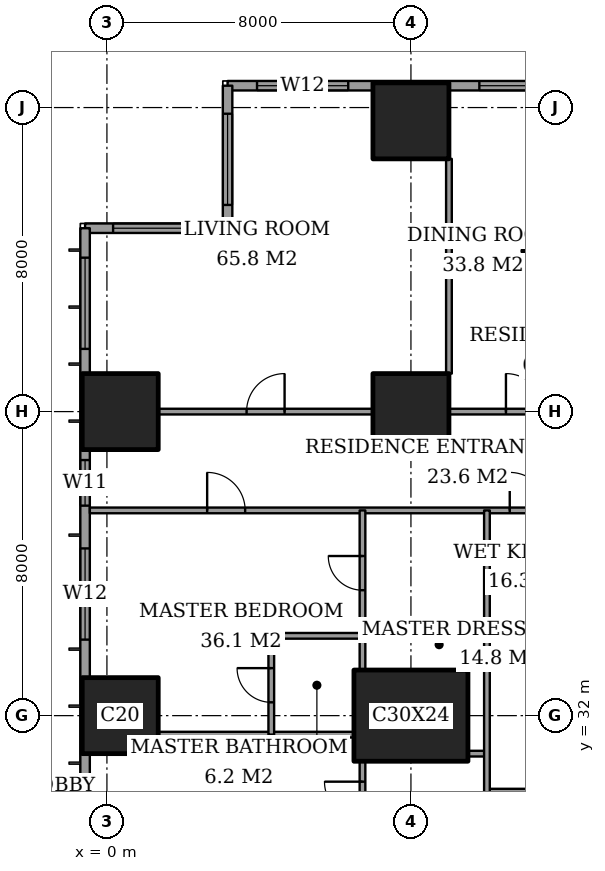
"""IFC4 building model, lengths in metres.
Left out: names, types, materials, properties, quantities, classifications, styles, units other than length and angle.
Written with IfcOpenShell. Run it as: python <this file> out.ifc"""

import sys

from ifc_helpers import new_model, si_unit, direction, frame, frame_2d, origin, origin_2d, place, context, subcontext, project, spatial, rectangle, extrude, element, fill, save


model = new_model("IFC4")
c1 = context("Model", 3, precision=1e-05, world=origin(), true_north=direction((0.0, 1.0)))
c2 = subcontext(c1, "Body", "Model", "MODEL_VIEW")
j1 = project(units=[si_unit("LENGTHUNIT", "METRE"), si_unit("PLANEANGLEUNIT", "RADIAN")], contexts=[c1])
p1 = place(None, origin())
s1 = spatial("IfcSite", under=j1, at=p1, CompositionType="ELEMENT")
p2 = place(p1, origin())
s2 = spatial("IfcBuilding", under=s1, at=p2, CompositionType="ELEMENT")
p3 = place(p2, frame((0.0, 0.0, 153.8)))
s3 = spatial("IfcBuildingStorey", under=s2, at=p3, CompositionType="ELEMENT", Elevation=153.8)
for number, where, z_axis, x_axis in (
    (1, (0.35, 32.0, 0.0), (0.0, 0.0, 1.0), (1.0, 0.0, 0.0)),
    (2, (0.35, 40.0, 0.0), (0.0, 0.0, 1.0), (1.0, 0.0, 0.0)),
):
    element("IfcColumn", number, at=place(p3, frame(where, z_axis=z_axis, x_axis=x_axis)), inside=s3, PredefinedType="COLUMN", context=c2, shape_type="SweptSolid", body=[
        extrude(rectangle(XDim=2.0, YDim=2.0, at=origin_2d()), origin(), (0.0, 0.0, 1.0), 3.6),
    ])
p4 = place(p3, frame((8.0, 32.0, 0.0), z_axis=(0.0, 0.0, 1.0), x_axis=(1.0, 0.0, 0.0)))
e3 = element("IfcColumn", 3, at=p4, inside=s3, PredefinedType="COLUMN", context=c2, shape_type="SweptSolid", body=[
    extrude(rectangle(XDim=3.0, YDim=2.4, at=origin_2d()), origin(), (0.0, 0.0, 1.0), 3.6),
])
for number, where, z_axis, x_axis in (
    (4, (8.0, 40.0, 0.0), (0.0, 0.0, 1.0), (1.0, 0.0, 0.0)),
    (5, (8.0, 47.65, 0.0), (0.0, 0.0, 1.0), (1.0, 0.0, 0.0)),
):
    element("IfcColumn", number, at=place(p3, frame(where, z_axis=z_axis, x_axis=x_axis)), inside=s3, PredefinedType="COLUMN", context=c2, shape_type="SweptSolid", body=[
        extrude(rectangle(XDim=2.0, YDim=2.0, at=origin_2d()), origin(), (0.0, 0.0, 1.0), 3.6),
    ])
p5 = place(p3, frame((24.575, 48.575, 0.0), z_axis=(0.0, 0.0, 1.0), x_axis=(-1.0, 0.0, 0.0)))
e6 = element("IfcWall", 6, at=p5, inside=s3, PredefinedType="SOLIDWALL", context=c2, shape_type="SweptSolid", body=[
    extrude(rectangle(XDim=21.4, YDim=0.25, at=frame_2d((10.7, 0.0))), origin(), (0.0, 0.0, 1.0), 3.6),
])
p6 = place(p5, frame((2.65, 0.0, 0.4)))
e7 = element("IfcOpeningElement", 7, at=p6, cuts=e6, PredefinedType="OPENING", context=c2, shape_type="SweptSolid", body=[
    extrude(rectangle(XDim=1.2, YDim=2.2, at=frame_2d((0.6, 1.1))), frame((0.0, 0.135, 0.0), z_axis=(0.0, -1.0, 0.0), x_axis=(1.0, 0.0, 0.0)), (0.0, 0.0, 1.0), 0.27),
])
p7 = place(p5, frame((5.175, 0.0, 0.4)))
e8 = element("IfcOpeningElement", 8, at=p7, cuts=e6, PredefinedType="OPENING", context=c2, shape_type="SweptSolid", body=[
    extrude(rectangle(XDim=1.2, YDim=2.2, at=frame_2d((0.6, 1.1))), frame((0.0, 0.135, 0.0), z_axis=(0.0, -1.0, 0.0), x_axis=(1.0, 0.0, 0.0)), (0.0, 0.0, 1.0), 0.27),
])
p8 = place(p5, frame((9.975, 0.0, 0.4)))
e9 = element("IfcOpeningElement", 9, at=p8, cuts=e6, PredefinedType="OPENING", context=c2, shape_type="SweptSolid", body=[
    extrude(rectangle(XDim=1.2, YDim=2.2, at=frame_2d((0.6, 1.1))), frame((0.0, 0.135, 0.0), z_axis=(0.0, -1.0, 0.0), x_axis=(1.0, 0.0, 0.0)), (0.0, 0.0, 1.0), 0.27),
])
p9 = place(p5, frame((12.375, 0.0, 0.4)))
e10 = element("IfcOpeningElement", 10, at=p9, cuts=e6, PredefinedType="OPENING", context=c2, shape_type="SweptSolid", body=[
    extrude(rectangle(XDim=2.4, YDim=2.2, at=frame_2d((1.2, 1.1))), frame((0.0, 0.135, 0.0), z_axis=(0.0, -1.0, 0.0), x_axis=(1.0, 0.0, 0.0)), (0.0, 0.0, 1.0), 0.27),
])
p10 = place(p5, frame((18.225, 0.0, 0.4)))
e11 = element("IfcOpeningElement", 11, at=p10, cuts=e6, PredefinedType="OPENING", context=c2, shape_type="SweptSolid", body=[
    extrude(rectangle(XDim=2.4, YDim=2.2, at=frame_2d((1.2, 1.1))), frame((0.0, 0.135, 0.0), z_axis=(0.0, -1.0, 0.0), x_axis=(1.0, 0.0, 0.0)), (0.0, 0.0, 1.0), 0.27),
])
p11 = place(p3, frame((3.175, 48.575, 0.0), z_axis=(0.0, 0.0, 1.0), x_axis=(0.0, -1.0, 0.0)))
e12 = element("IfcWall", 12, at=p11, inside=s3, PredefinedType="SOLIDWALL", context=c2, shape_type="SweptSolid", body=[
    extrude(rectangle(XDim=3.75, YDim=0.25, at=frame_2d((1.875, 0.0))), origin(), (0.0, 0.0, 1.0), 3.6),
])
p12 = place(p11, frame((0.738, 0.0, 0.4)))
e13 = element("IfcOpeningElement", 13, at=p12, cuts=e12, PredefinedType="OPENING", context=c2, shape_type="SweptSolid", body=[
    extrude(rectangle(XDim=2.4, YDim=2.2, at=frame_2d((1.2, 1.1))), frame((0.0, 0.135, 0.0), z_axis=(0.0, -1.0, 0.0), x_axis=(1.0, 0.0, 0.0)), (0.0, 0.0, 1.0), 0.27),
])
p13 = place(p3, frame((3.175, 44.825, 0.0), z_axis=(0.0, 0.0, 1.0), x_axis=(-1.0, 0.0, 0.0)))
e14 = element("IfcWall", 14, at=p13, inside=s3, PredefinedType="SOLIDWALL", context=c2, shape_type="SweptSolid", body=[
    extrude(rectangle(XDim=3.75, YDim=0.25, at=frame_2d((1.875, 0.0))), origin(), (0.0, 0.0, 1.0), 3.6),
])
p14 = place(p13, frame((0.613, 0.0, 0.4)))
e15 = element("IfcOpeningElement", 15, at=p14, cuts=e14, PredefinedType="OPENING", context=c2, shape_type="SweptSolid", body=[
    extrude(rectangle(XDim=2.4, YDim=2.2, at=frame_2d((1.2, 1.1))), frame((0.0, 0.135, 0.0), z_axis=(0.0, -1.0, 0.0), x_axis=(1.0, 0.0, 0.0)), (0.0, 0.0, 1.0), 0.27),
])
p15 = place(p3, frame((-0.575, 44.825, 0.0), z_axis=(0.0, 0.0, 1.0), x_axis=(0.0, -1.0, 0.0)))
e16 = element("IfcWall", 16, at=p15, inside=s3, PredefinedType="SOLIDWALL", context=c2, shape_type="SweptSolid", body=[
    extrude(rectangle(XDim=41.65, YDim=0.25, at=frame_2d((20.825, 0.0))), origin(), (0.0, 0.0, 1.0), 3.6),
])
p16 = place(p15, frame((0.775, 0.0, 0.4)))
e17 = element("IfcOpeningElement", 17, at=p16, cuts=e16, PredefinedType="OPENING", context=c2, shape_type="SweptSolid", body=[
    extrude(rectangle(XDim=2.4, YDim=2.2, at=frame_2d((1.2, 1.1))), frame((0.0, 0.135, 0.0), z_axis=(0.0, -1.0, 0.0), x_axis=(1.0, 0.0, 0.0)), (0.0, 0.0, 1.0), 0.27),
])
p17 = place(p15, frame((6.1, 0.0, 0.4)))
e18 = element("IfcOpeningElement", 18, at=p17, cuts=e16, PredefinedType="OPENING", context=c2, shape_type="SweptSolid", body=[
    extrude(rectangle(XDim=1.2, YDim=2.2, at=frame_2d((0.6, 1.1))), frame((0.0, 0.135, 0.0), z_axis=(0.0, -1.0, 0.0), x_axis=(1.0, 0.0, 0.0)), (0.0, 0.0, 1.0), 0.27),
])
p18 = place(p15, frame((8.425, 0.0, 0.4)))
e19 = element("IfcOpeningElement", 19, at=p18, cuts=e16, PredefinedType="OPENING", context=c2, shape_type="SweptSolid", body=[
    extrude(rectangle(XDim=2.4, YDim=2.2, at=frame_2d((1.2, 1.1))), frame((0.0, 0.135, 0.0), z_axis=(0.0, -1.0, 0.0), x_axis=(1.0, 0.0, 0.0)), (0.0, 0.0, 1.0), 0.27),
])
p19 = place(p15, frame((15.625, 0.0, 0.4)))
e20 = element("IfcOpeningElement", 20, at=p19, cuts=e16, PredefinedType="OPENING", context=c2, shape_type="SweptSolid", body=[
    extrude(rectangle(XDim=2.4, YDim=2.2, at=frame_2d((1.2, 1.1))), frame((0.0, 0.135, 0.0), z_axis=(0.0, -1.0, 0.0), x_axis=(1.0, 0.0, 0.0)), (0.0, 0.0, 1.0), 0.27),
])
p20 = place(p15, frame((23.625, 0.0, 0.4)))
e21 = element("IfcOpeningElement", 21, at=p20, cuts=e16, PredefinedType="OPENING", context=c2, shape_type="SweptSolid", body=[
    extrude(rectangle(XDim=2.4, YDim=2.2, at=frame_2d((1.2, 1.1))), frame((0.0, 0.135, 0.0), z_axis=(0.0, -1.0, 0.0), x_axis=(1.0, 0.0, 0.0)), (0.0, 0.0, 1.0), 0.27),
])
p21 = place(p15, frame((30.825, 0.0, 0.4)))
e22 = element("IfcOpeningElement", 22, at=p21, cuts=e16, PredefinedType="OPENING", context=c2, shape_type="SweptSolid", body=[
    extrude(rectangle(XDim=2.4, YDim=2.2, at=frame_2d((1.2, 1.1))), frame((0.0, 0.135, 0.0), z_axis=(0.0, -1.0, 0.0), x_axis=(1.0, 0.0, 0.0)), (0.0, 0.0, 1.0), 0.27),
])
p22 = place(p15, frame((34.5, 0.0, 0.4)))
e23 = element("IfcOpeningElement", 23, at=p22, cuts=e16, PredefinedType="OPENING", context=c2, shape_type="SweptSolid", body=[
    extrude(rectangle(XDim=1.2, YDim=2.2, at=frame_2d((0.6, 1.1))), frame((0.0, 0.135, 0.0), z_axis=(0.0, -1.0, 0.0), x_axis=(1.0, 0.0, 0.0)), (0.0, 0.0, 1.0), 0.27),
])
p23 = place(p15, frame((38.475, 0.0, 0.4)))
e24 = element("IfcOpeningElement", 24, at=p23, cuts=e16, PredefinedType="OPENING", context=c2, shape_type="SweptSolid", body=[
    extrude(rectangle(XDim=2.4, YDim=2.2, at=frame_2d((1.2, 1.1))), frame((0.0, 0.135, 0.0), z_axis=(0.0, -1.0, 0.0), x_axis=(1.0, 0.0, 0.0)), (0.0, 0.0, 1.0), 0.27),
])
p24 = place(p3, frame((10.0, 30.0, 0.0), z_axis=(0.0, 0.0, 1.0), x_axis=(1.0, 0.0, 0.0)))
e25 = element("IfcWall", 25, at=p24, inside=s3, PredefinedType="PARTITIONING", context=c2, shape_type="SweptSolid", body=[
    extrude(rectangle(XDim=4.4, YDim=0.15, at=frame_2d((2.2, 0.0))), origin(), (0.0, 0.0, 1.0), 3.35),
])
p25 = place(p24, frame((2.8, 0.0, 0.0)))
e26 = element("IfcOpeningElement", 26, at=p25, cuts=e25, PredefinedType="OPENING", context=c2, shape_type="SweptSolid", body=[
    extrude(rectangle(XDim=1.0, YDim=2.1, at=frame_2d((0.5, 1.05))), frame((0.0, 0.085, 0.0), z_axis=(0.0, -1.0, 0.0), x_axis=(1.0, 0.0, 0.0)), (0.0, 0.0, 1.0), 0.17),
])
p26 = place(p3, frame((9.5, 31.0, 0.0), z_axis=(0.0, 0.0, 1.0), x_axis=(1.0, 0.0, 0.0)))
e27 = element("IfcWall", 27, at=p26, inside=s3, PredefinedType="PARTITIONING", context=c2, shape_type="SweptSolid", body=[
    extrude(rectangle(XDim=0.5, YDim=0.15, at=frame_2d((0.25, 0.0))), origin(), (0.0, 0.0, 1.0), 3.35),
])
p27 = place(p3, frame((1.35, 31.5, 0.0), z_axis=(0.0, 0.0, 1.0), x_axis=(1.0, 0.0, 0.0)))
e28 = element("IfcWall", 28, at=p27, inside=s3, PredefinedType="PARTITIONING", context=c2, shape_type="SweptSolid", body=[
    extrude(rectangle(XDim=5.15, YDim=0.15, at=frame_2d((2.575, 0.0))), origin(), (0.0, 0.0, 1.0), 3.35),
])
p28 = place(p3, frame((4.325, 34.1, 0.0), z_axis=(0.0, 0.0, 1.0), x_axis=(1.0, 0.0, 0.0)))
e29 = element("IfcWall", 29, at=p28, inside=s3, PredefinedType="PARTITIONING", context=c2, shape_type="SweptSolid", body=[
    extrude(rectangle(XDim=2.4, YDim=0.15, at=frame_2d((1.2, 0.0))), origin(), (0.0, 0.0, 1.0), 3.35),
])
p29 = place(p3, frame((-0.45, 37.4, 0.0), z_axis=(0.0, 0.0, 1.0), x_axis=(1.0, 0.0, 0.0)))
e30 = element("IfcWall", 30, at=p29, inside=s3, PredefinedType="PARTITIONING", context=c2, shape_type="SweptSolid", body=[
    extrude(rectangle(XDim=25.011, YDim=0.15, at=frame_2d((12.505, 0.0))), origin(), (0.0, 0.0, 1.0), 3.35),
])
p30 = place(p29, frame((13.25, 0.0, 0.0)))
e31 = element("IfcOpeningElement", 31, at=p30, cuts=e30, PredefinedType="OPENING", context=c2, shape_type="SweptSolid", body=[
    extrude(rectangle(XDim=1.0, YDim=2.1, at=frame_2d((0.5, 1.05))), frame((0.0, 0.085, 0.0), z_axis=(0.0, -1.0, 0.0), x_axis=(1.0, 0.0, 0.0)), (0.0, 0.0, 1.0), 0.17),
])
p31 = place(p29, frame((3.087, 0.0, 0.0)))
e32 = element("IfcOpeningElement", 32, at=p31, cuts=e30, PredefinedType="OPENING", context=c2, shape_type="SweptSolid", body=[
    extrude(rectangle(XDim=1.0, YDim=2.1, at=frame_2d((0.5, 1.05))), frame((0.0, 0.085, 0.0), z_axis=(0.0, -1.0, 0.0), x_axis=(1.0, 0.0, 0.0)), (0.0, 0.0, 1.0), 0.17),
])
p32 = place(p29, frame((11.05, 0.0, 0.0)))
e33 = element("IfcOpeningElement", 33, at=p32, cuts=e30, PredefinedType="OPENING", context=c2, shape_type="SweptSolid", body=[
    extrude(rectangle(XDim=1.0, YDim=2.1, at=frame_2d((0.5, 1.05))), frame((0.0, 0.085, 0.0), z_axis=(0.0, -1.0, 0.0), x_axis=(1.0, 0.0, 0.0)), (0.0, 0.0, 1.0), 0.17),
])
p33 = place(p29, frame((16.15, 0.0, 0.0)))
e34 = element("IfcOpeningElement", 34, at=p33, cuts=e30, PredefinedType="OPENING", context=c2, shape_type="SweptSolid", body=[
    extrude(rectangle(XDim=1.0, YDim=2.1, at=frame_2d((0.5, 1.05))), frame((0.0, 0.085, 0.0), z_axis=(0.0, -1.0, 0.0), x_axis=(1.0, 0.0, 0.0)), (0.0, 0.0, 1.0), 0.17),
])
p34 = place(p29, frame((21.175, 0.0, 0.0)))
e35 = element("IfcOpeningElement", 35, at=p34, cuts=e30, PredefinedType="OPENING", context=c2, shape_type="SweptSolid", body=[
    extrude(rectangle(XDim=1.0, YDim=2.1, at=frame_2d((0.5, 1.05))), frame((0.0, 0.085, 0.0), z_axis=(0.0, -1.0, 0.0), x_axis=(1.0, 0.0, 0.0)), (0.0, 0.0, 1.0), 0.17),
])
p35 = place(p3, frame((1.35, 40.0, 0.0), z_axis=(0.0, 0.0, 1.0), x_axis=(1.0, 0.0, 0.0)))
e36 = element("IfcWall", 36, at=p35, inside=s3, PredefinedType="PARTITIONING", context=c2, shape_type="SweptSolid", body=[
    extrude(rectangle(XDim=5.65, YDim=0.15, at=frame_2d((2.825, 0.0))), origin(), (0.0, 0.0, 1.0), 3.35),
])
p36 = place(p35, frame((2.325, 0.0, 0.0)))
e37 = element("IfcOpeningElement", 37, at=p36, cuts=e36, PredefinedType="OPENING", context=c2, shape_type="SweptSolid", body=[
    extrude(rectangle(XDim=1.0, YDim=2.1, at=frame_2d((0.5, 1.05))), frame((0.0, 0.085, 0.0), z_axis=(0.0, -1.0, 0.0), x_axis=(1.0, 0.0, 0.0)), (0.0, 0.0, 1.0), 0.17),
])
p37 = place(p3, frame((9.0, 40.0, 0.0), z_axis=(0.0, 0.0, 1.0), x_axis=(1.0, 0.0, 0.0)))
e38 = element("IfcWall", 38, at=p37, inside=s3, PredefinedType="PARTITIONING", context=c2, shape_type="SweptSolid", body=[
    extrude(rectangle(XDim=6.0, YDim=0.15, at=frame_2d((3.0, 0.0))), origin(), (0.0, 0.0, 1.0), 3.35),
])
p38 = place(p37, frame((1.5, 0.0, 0.0)))
e39 = element("IfcOpeningElement", 39, at=p38, cuts=e38, PredefinedType="OPENING", context=c2, shape_type="SweptSolid", body=[
    extrude(rectangle(XDim=1.0, YDim=2.1, at=frame_2d((0.5, 1.05))), frame((0.0, 0.085, 0.0), z_axis=(0.0, -1.0, 0.0), x_axis=(1.0, 0.0, 0.0)), (0.0, 0.0, 1.0), 0.17),
])
p39 = place(p37, frame((4.5, 0.0, 0.0)))
e40 = element("IfcOpeningElement", 40, at=p39, cuts=e38, PredefinedType="OPENING", context=c2, shape_type="SweptSolid", body=[
    extrude(rectangle(XDim=1.0, YDim=2.1, at=frame_2d((0.5, 1.05))), frame((0.0, 0.085, 0.0), z_axis=(0.0, -1.0, 0.0), x_axis=(1.0, 0.0, 0.0)), (0.0, 0.0, 1.0), 0.17),
])
p40 = place(p3, frame((4.325, 31.5, 0.0), z_axis=(0.0, 0.0, 1.0), x_axis=(0.0, 1.0, 0.0)))
e41 = element("IfcWall", 41, at=p40, inside=s3, PredefinedType="PARTITIONING", context=c2, shape_type="SweptSolid", body=[
    extrude(rectangle(XDim=2.6, YDim=0.15, at=frame_2d((1.3, 0.0))), origin(), (0.0, 0.0, 1.0), 3.35),
])
p41 = place(p40, frame((0.85, 0.0, 0.0)))
e42 = element("IfcOpeningElement", 42, at=p41, cuts=e41, PredefinedType="OPENING", context=c2, shape_type="SweptSolid", body=[
    extrude(rectangle(XDim=0.9, YDim=2.1, at=frame_2d((0.45, 1.05))), frame((0.0, 0.085, 0.0), z_axis=(0.0, -1.0, 0.0), x_axis=(1.0, 0.0, 0.0)), (0.0, 0.0, 1.0), 0.17),
])
p42 = place(p3, frame((6.725, 28.35, 0.0), z_axis=(0.0, 0.0, 1.0), x_axis=(0.0, 1.0, 0.0)))
e43 = element("IfcWall", 43, at=p42, inside=s3, PredefinedType="PARTITIONING", context=c2, shape_type="SweptSolid", body=[
    extrude(rectangle(XDim=2.45, YDim=0.15, at=frame_2d((1.225, 0.0))), origin(), (0.0, 0.0, 1.0), 3.35),
])
p43 = place(p42, frame((0.913, 0.0, 0.0)))
e44 = element("IfcOpeningElement", 44, at=p43, cuts=e43, PredefinedType="OPENING", context=c2, shape_type="SweptSolid", body=[
    extrude(rectangle(XDim=1.0, YDim=2.1, at=frame_2d((0.5, 1.05))), frame((0.0, 0.085, 0.0), z_axis=(0.0, -1.0, 0.0), x_axis=(1.0, 0.0, 0.0)), (0.0, 0.0, 1.0), 0.17),
])
p44 = place(p3, frame((6.725, 33.2, 0.0), z_axis=(0.0, 0.0, 1.0), x_axis=(0.0, 1.0, 0.0)))
e45 = element("IfcWall", 45, at=p44, inside=s3, PredefinedType="PARTITIONING", context=c2, shape_type="SweptSolid", body=[
    extrude(rectangle(XDim=4.2, YDim=0.15, at=frame_2d((2.1, 0.0))), origin(), (0.0, 0.0, 1.0), 3.35),
])
p45 = place(p44, frame((2.1, 0.0, 0.0)))
e46 = element("IfcOpeningElement", 46, at=p45, cuts=e45, PredefinedType="OPENING", context=c2, shape_type="SweptSolid", body=[
    extrude(rectangle(XDim=0.9, YDim=2.1, at=frame_2d((0.45, 1.05))), frame((0.0, 0.085, 0.0), z_axis=(0.0, -1.0, 0.0), x_axis=(1.0, 0.0, 0.0)), (0.0, 0.0, 1.0), 0.17),
])
p46 = place(p3, frame((9.0, 41.0, 0.0), z_axis=(0.0, 0.0, 1.0), x_axis=(0.0, 1.0, 0.0)))
e47 = element("IfcWall", 47, at=p46, inside=s3, PredefinedType="PARTITIONING", context=c2, shape_type="SweptSolid", body=[
    extrude(rectangle(XDim=5.65, YDim=0.15, at=frame_2d((2.825, 0.0))), origin(), (0.0, 0.0, 1.0), 3.35),
])
p47 = place(p3, frame((10.0, 28.0, 0.0), z_axis=(0.0, 0.0, 1.0), x_axis=(0.0, 1.0, 0.0)))
e48 = element("IfcWall", 48, at=p47, inside=s3, PredefinedType="PARTITIONING", context=c2, shape_type="SweptSolid", body=[
    extrude(rectangle(XDim=9.4, YDim=0.15, at=frame_2d((4.7, 0.0))), origin(), (0.0, 0.0, 1.0), 3.35),
])
p48 = place(p47, frame((0.5, 0.0, 0.0)))
e49 = element("IfcOpeningElement", 49, at=p48, cuts=e48, PredefinedType="OPENING", context=c2, shape_type="SweptSolid", body=[
    extrude(rectangle(XDim=1.0, YDim=2.1, at=frame_2d((0.5, 1.05))), frame((0.0, 0.085, 0.0), z_axis=(0.0, -1.0, 0.0), x_axis=(1.0, 0.0, 0.0)), (0.0, 0.0, 1.0), 0.17),
])
p49 = place(p9, origin())
e50 = element("IfcWindow", 50, at=p49, inside=s3, PartitioningType="SINGLE_PANEL", PredefinedType="WINDOW", context=c2, shape_type="SweptSolid", body=[
    extrude(rectangle(XDim=2.4, YDim=2.2, at=frame_2d((1.2, 1.1))), frame((0.0, 0.03, 0.0), z_axis=(0.0, -1.0, 0.0), x_axis=(1.0, 0.0, 0.0)), (0.0, 0.0, 1.0), 0.06),
])
fill(e10, e50)
p50 = place(p10, origin())
e51 = element("IfcWindow", 51, at=p50, inside=s3, PartitioningType="SINGLE_PANEL", PredefinedType="WINDOW", context=c2, shape_type="SweptSolid", body=[
    extrude(rectangle(XDim=2.4, YDim=2.2, at=frame_2d((1.2, 1.1))), frame((0.0, 0.03, 0.0), z_axis=(0.0, -1.0, 0.0), x_axis=(1.0, 0.0, 0.0)), (0.0, 0.0, 1.0), 0.06),
])
fill(e11, e51)
p51 = place(p12, origin())
e52 = element("IfcWindow", 52, at=p51, inside=s3, PartitioningType="SINGLE_PANEL", PredefinedType="WINDOW", context=c2, shape_type="SweptSolid", body=[
    extrude(rectangle(XDim=2.4, YDim=2.2, at=frame_2d((1.2, 1.1))), frame((0.0, 0.03, 0.0), z_axis=(0.0, -1.0, 0.0), x_axis=(1.0, 0.0, 0.0)), (0.0, 0.0, 1.0), 0.06),
])
fill(e13, e52)
p52 = place(p14, origin())
e53 = element("IfcWindow", 53, at=p52, inside=s3, PartitioningType="SINGLE_PANEL", PredefinedType="WINDOW", context=c2, shape_type="SweptSolid", body=[
    extrude(rectangle(XDim=2.4, YDim=2.2, at=frame_2d((1.2, 1.1))), frame((0.0, 0.03, 0.0), z_axis=(0.0, -1.0, 0.0), x_axis=(1.0, 0.0, 0.0)), (0.0, 0.0, 1.0), 0.06),
])
fill(e15, e53)
p53 = place(p16, origin())
e54 = element("IfcWindow", 54, at=p53, inside=s3, PartitioningType="SINGLE_PANEL", PredefinedType="WINDOW", context=c2, shape_type="SweptSolid", body=[
    extrude(rectangle(XDim=2.4, YDim=2.2, at=frame_2d((1.2, 1.1))), frame((0.0, 0.03, 0.0), z_axis=(0.0, -1.0, 0.0), x_axis=(1.0, 0.0, 0.0)), (0.0, 0.0, 1.0), 0.06),
])
fill(e17, e54)
p54 = place(p17, origin())
e55 = element("IfcWindow", 55, at=p54, inside=s3, PartitioningType="SINGLE_PANEL", PredefinedType="WINDOW", context=c2, shape_type="SweptSolid", body=[
    extrude(rectangle(XDim=1.2, YDim=2.2, at=frame_2d((0.6, 1.1))), frame((0.0, 0.03, 0.0), z_axis=(0.0, -1.0, 0.0), x_axis=(1.0, 0.0, 0.0)), (0.0, 0.0, 1.0), 0.06),
])
fill(e18, e55)
p55 = place(p18, origin())
e56 = element("IfcWindow", 56, at=p55, inside=s3, PartitioningType="SINGLE_PANEL", PredefinedType="WINDOW", context=c2, shape_type="SweptSolid", body=[
    extrude(rectangle(XDim=2.4, YDim=2.2, at=frame_2d((1.2, 1.1))), frame((0.0, 0.03, 0.0), z_axis=(0.0, -1.0, 0.0), x_axis=(1.0, 0.0, 0.0)), (0.0, 0.0, 1.0), 0.06),
])
fill(e19, e56)
p56 = place(p36, origin())
e57 = element("IfcDoor", 57, at=p56, inside=s3, OperationType="SINGLE_SWING_LEFT", PredefinedType="DOOR", context=c2, shape_type="SweptSolid", body=[
    extrude(rectangle(XDim=1.0, YDim=2.1, at=frame_2d((0.5, 1.05))), frame((0.0, 0.025, 0.0), z_axis=(0.0, -1.0, 0.0), x_axis=(1.0, 0.0, 0.0)), (0.0, 0.0, 1.0), 0.05),
])
fill(e37, e57)
p57 = place(p38, origin())
e58 = element("IfcDoor", 58, at=p57, inside=s3, OperationType="SINGLE_SWING_RIGHT", PredefinedType="DOOR", context=c2, shape_type="SweptSolid", body=[
    extrude(rectangle(XDim=1.0, YDim=2.1, at=frame_2d((0.5, 1.05))), frame((0.0, 0.025, 0.0), z_axis=(0.0, -1.0, 0.0), x_axis=(1.0, 0.0, 0.0)), (0.0, 0.0, 1.0), 0.05),
])
fill(e39, e58)
p58 = place(p41, origin())
e59 = element("IfcDoor", 59, at=p58, inside=s3, OperationType="SINGLE_SWING_LEFT", PredefinedType="DOOR", context=c2, shape_type="SweptSolid", body=[
    extrude(rectangle(XDim=0.9, YDim=2.1, at=frame_2d((0.45, 1.05))), frame((0.0, 0.025, 0.0), z_axis=(0.0, -1.0, 0.0), x_axis=(1.0, 0.0, 0.0)), (0.0, 0.0, 1.0), 0.05),
])
fill(e42, e59)
p59 = place(p31, origin())
e60 = element("IfcDoor", 60, at=p59, inside=s3, OperationType="SINGLE_SWING_RIGHT", PredefinedType="DOOR", context=c2, shape_type="SweptSolid", body=[
    extrude(rectangle(XDim=1.0, YDim=2.1, at=frame_2d((0.5, 1.05))), frame((0.0, 0.025, 0.0), z_axis=(0.0, -1.0, 0.0), x_axis=(1.0, 0.0, 0.0)), (0.0, 0.0, 1.0), 0.05),
])
fill(e32, e60)
p60 = place(p43, origin())
e61 = element("IfcDoor", 61, at=p60, inside=s3, OperationType="SINGLE_SWING_LEFT", PredefinedType="DOOR", context=c2, shape_type="SweptSolid", body=[
    extrude(rectangle(XDim=1.0, YDim=2.1, at=frame_2d((0.5, 1.05))), frame((0.0, 0.025, 0.0), z_axis=(0.0, -1.0, 0.0), x_axis=(1.0, 0.0, 0.0)), (0.0, 0.0, 1.0), 0.05),
])
fill(e44, e61)
p61 = place(p45, origin())
e62 = element("IfcDoor", 62, at=p61, inside=s3, OperationType="SINGLE_SWING_LEFT", PredefinedType="DOOR", context=c2, shape_type="SweptSolid", body=[
    extrude(rectangle(XDim=0.9, YDim=2.1, at=frame_2d((0.45, 1.05))), frame((0.0, 0.025, 0.0), z_axis=(0.0, -1.0, 0.0), x_axis=(1.0, 0.0, 0.0)), (0.0, 0.0, 1.0), 0.05),
])
fill(e46, e62)
p62 = place(p32, origin())
e63 = element("IfcDoor", 63, at=p62, inside=s3, OperationType="SINGLE_SWING_RIGHT", PredefinedType="DOOR", context=c2, shape_type="SweptSolid", body=[
    extrude(rectangle(XDim=1.0, YDim=2.1, at=frame_2d((0.5, 1.05))), frame((0.0, 0.025, 0.0), z_axis=(0.0, -1.0, 0.0), x_axis=(1.0, 0.0, 0.0)), (0.0, 0.0, 1.0), 0.05),
])
fill(e33, e63)
save(model, sys.argv[1])
